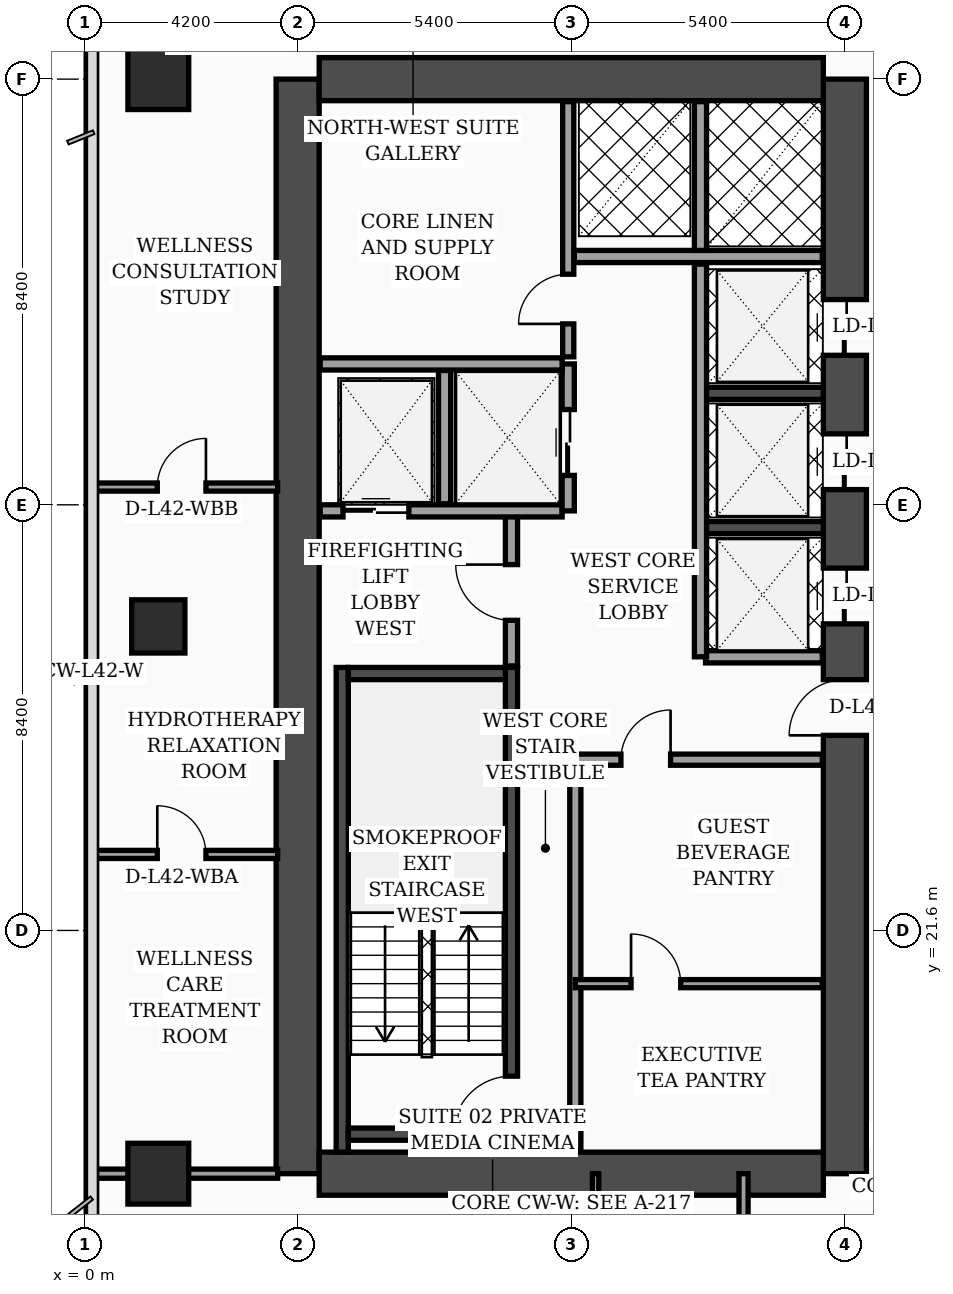
"""IFC4 building model, lengths in metres.
Left out: names, types, materials, properties, quantities, classifications, styles, units other than length and angle.
Written with IfcOpenShell. Run it as: python <this file> out.ifc"""

import sys

from ifc_helpers import new_model, si_unit, direction, frame, frame_2d, origin, origin_2d, place, context, subcontext, project, spatial, rectangle, extrude, element, fill, save


model = new_model("IFC4")
c1 = context("Model", 3, precision=1e-05, world=origin(), true_north=direction((0.0, 1.0)))
c2 = subcontext(c1, "Body", "Model", "MODEL_VIEW")
j1 = project(units=[si_unit("LENGTHUNIT", "METRE"), si_unit("PLANEANGLEUNIT", "RADIAN")], contexts=[c1])
p1 = place(None, origin())
s1 = spatial("IfcSite", under=j1, at=p1, CompositionType="ELEMENT")
p2 = place(p1, origin())
s2 = spatial("IfcBuilding", under=s1, at=p2, CompositionType="ELEMENT")
p3 = place(p2, frame((0.0, 0.0, 171.3)))
s3 = spatial("IfcBuildingStorey", under=s2, at=p3, CompositionType="ELEMENT", Elevation=171.3)
p4 = place(p3, frame((4.2, 16.8, 0.0), z_axis=(0.0, 0.0, 1.0), x_axis=(0.0, 1.0, 0.0)))
e1 = element("IfcWall", 1, at=p4, inside=s3, PredefinedType="SHEAR", context=c2, shape_type="SweptSolid", body=[
    extrude(rectangle(XDim=21.6, YDim=0.85, at=frame_2d((10.8, 0.0))), origin(), (0.0, 0.0, 1.0), 3.56),
])
p5 = place(p3, frame((15.0, 16.8, 0.0), z_axis=(0.0, 0.0, 1.0), x_axis=(0.0, 1.0, 0.0)))
e2 = element("IfcWall", 2, at=p5, inside=s3, PredefinedType="SHEAR", context=c2, shape_type="SweptSolid", body=[
    extrude(rectangle(XDim=21.6, YDim=0.85, at=frame_2d((10.8, 0.0))), origin(), (0.0, 0.0, 1.0), 3.56),
])
p6 = place(p5, frame((8.65, 0.0, 0.0)))
e3 = element("IfcOpeningElement", 3, at=p6, cuts=e2, PredefinedType="OPENING", context=c2, shape_type="SweptSolid", body=[
    extrude(rectangle(XDim=1.1, YDim=2.2, at=frame_2d((0.55, 1.1))), frame((0.0, 0.435, 0.0), z_axis=(0.0, -1.0, 0.0), x_axis=(1.0, 0.0, 0.0)), (0.0, 0.0, 1.0), 0.87),
])
p7 = place(p5, frame((10.85, 0.0, 0.0)))
e4 = element("IfcOpeningElement", 4, at=p7, cuts=e2, PredefinedType="OPENING", context=c2, shape_type="SweptSolid", body=[
    extrude(rectangle(XDim=1.1, YDim=2.2, at=frame_2d((0.55, 1.1))), frame((0.0, 0.435, 0.0), z_axis=(0.0, -1.0, 0.0), x_axis=(1.0, 0.0, 0.0)), (0.0, 0.0, 1.0), 0.87),
])
p8 = place(p5, frame((13.5, 0.0, 0.0)))
e5 = element("IfcOpeningElement", 5, at=p8, cuts=e2, PredefinedType="OPENING", context=c2, shape_type="SweptSolid", body=[
    extrude(rectangle(XDim=1.1, YDim=2.2, at=frame_2d((0.55, 1.1))), frame((0.0, 0.435, 0.0), z_axis=(0.0, -1.0, 0.0), x_axis=(1.0, 0.0, 0.0)), (0.0, 0.0, 1.0), 0.87),
])
p9 = place(p5, frame((16.15, 0.0, 0.0)))
e6 = element("IfcOpeningElement", 6, at=p9, cuts=e2, PredefinedType="OPENING", context=c2, shape_type="SweptSolid", body=[
    extrude(rectangle(XDim=1.1, YDim=2.2, at=frame_2d((0.55, 1.1))), frame((0.0, 0.435, 0.0), z_axis=(0.0, -1.0, 0.0), x_axis=(1.0, 0.0, 0.0)), (0.0, 0.0, 1.0), 0.87),
])
for number, where, z_axis, x_axis in (
    (7, (4.625, 38.4, 0.0), (0.0, 0.0, 1.0), (1.0, 0.0, 0.0)),
    (8, (4.625, 16.8, 0.0), (0.0, 0.0, 1.0), (1.0, 0.0, 0.0)),
):
    element("IfcWall", number, at=place(p3, frame(where, z_axis=z_axis, x_axis=x_axis)), inside=s3, PredefinedType="SHEAR", context=c2, shape_type="SweptSolid", body=[
        extrude(rectangle(XDim=9.95, YDim=0.85, at=frame_2d((4.975, 0.0))), origin(), (0.0, 0.0, 1.0), 3.56),
    ])
p10 = place(p3, frame((5.08, 17.225, 0.0), z_axis=(0.0, 0.0, 1.0), x_axis=(0.0, 1.0, 0.0)))
e9 = element("IfcWall", 9, at=p10, inside=s3, PredefinedType="SOLIDWALL", context=c2, shape_type="SweptSolid", body=[
    extrude(rectangle(XDim=9.565, YDim=0.24, at=frame_2d((4.782, 0.0))), origin(), (0.0, 0.0, 1.0), 3.56),
])
p11 = place(p3, frame((8.42, 17.225, 0.0), z_axis=(0.0, 0.0, 1.0), x_axis=(0.0, 1.0, 0.0)))
e10 = element("IfcWall", 10, at=p11, inside=s3, PredefinedType="SOLIDWALL", context=c2, shape_type="SweptSolid", body=[
    extrude(rectangle(XDim=9.565, YDim=0.24, at=frame_2d((4.782, 0.0))), origin(), (0.0, 0.0, 1.0), 3.56),
])
p12 = place(p11, frame((0.35, 0.0, 0.0)))
e11 = element("IfcOpeningElement", 11, at=p12, cuts=e10, PredefinedType="OPENING", context=c2, shape_type="SweptSolid", body=[
    extrude(rectangle(XDim=1.15, YDim=2.2, at=frame_2d((0.575, 1.1))), frame((0.0, 0.13, 0.0), z_axis=(0.0, -1.0, 0.0), x_axis=(1.0, 0.0, 0.0)), (0.0, 0.0, 1.0), 0.26),
])
for number, where, z_axis, x_axis in (
    (12, (5.2, 17.58, 0.0), (0.0, 0.0, 1.0), (1.0, 0.0, 0.0)),
    (13, (5.2, 26.67, 0.0), (0.0, 0.0, 1.0), (1.0, 0.0, 0.0)),
):
    element("IfcWall", number, at=place(p3, frame(where, z_axis=z_axis, x_axis=x_axis)), inside=s3, PredefinedType="SOLIDWALL", context=c2, shape_type="SweptSolid", body=[
        extrude(rectangle(XDim=3.1, YDim=0.24, at=frame_2d((1.55, 0.0))), origin(), (0.0, 0.0, 1.0), 3.56),
    ])
for number, where, z_axis, x_axis in (
    (14, (12.18, 29.55, 0.0), (0.0, 0.0, 1.0), (1.0, 0.0, 0.0)),
    (15, (12.18, 32.2, 0.0), (0.0, 0.0, 1.0), (1.0, 0.0, 0.0)),
):
    element("IfcWall", number, at=place(p3, frame(where, z_axis=z_axis, x_axis=x_axis)), inside=s3, PredefinedType="SOLIDWALL", context=c2, shape_type="SweptSolid", body=[
        extrude(rectangle(XDim=2.395, YDim=0.24, at=frame_2d((1.198, 0.0))), origin(), (0.0, 0.0, 1.0), 3.56),
    ])
p13 = place(p3, frame((1.45, 16.8, 0.0), z_axis=(0.0, 0.0, 1.0), x_axis=(1.0, 0.0, 0.0)))
e16 = element("IfcColumn", 16, at=p13, inside=s3, PredefinedType="COLUMN", context=c2, shape_type="SweptSolid", body=[
    extrude(rectangle(XDim=1.2, YDim=1.2, at=origin_2d()), origin(), (0.0, 0.0, 1.0), 3.56),
])
p14 = place(p3, frame((1.45, 27.6, 0.0), z_axis=(0.0, 0.0, 1.0), x_axis=(1.0, 0.0, 0.0)))
e17 = element("IfcColumn", 17, at=p14, inside=s3, PredefinedType="COLUMN", context=c2, shape_type="SweptSolid", body=[
    extrude(rectangle(XDim=1.05, YDim=1.05, at=origin_2d()), origin(), (0.0, 0.0, 1.0), 3.56),
])
p15 = place(p3, frame((1.45, 38.4, 0.0), z_axis=(0.0, 0.0, 1.0), x_axis=(1.0, 0.0, 0.0)))
e18 = element("IfcColumn", 18, at=p15, inside=s3, PredefinedType="COLUMN", context=c2, shape_type="SweptSolid", body=[
    extrude(rectangle(XDim=1.2, YDim=1.2, at=origin_2d()), origin(), (0.0, 0.0, 1.0), 3.56),
])
p16 = place(p3, frame((8.42, 26.82, 0.0), z_axis=(0.0, 0.0, 1.0), x_axis=(0.0, 1.0, 0.0)))
e19 = element("IfcWall", 19, at=p16, inside=s3, PredefinedType="SOLIDWALL", context=c2, shape_type="SweptSolid", body=[
    extrude(rectangle(XDim=3.0, YDim=0.24, at=frame_2d((1.5, 0.0))), origin(), (0.0, 0.0, 1.0), 3.56),
])
p17 = place(p16, frame((0.9, 0.0, 0.0)))
e20 = element("IfcOpeningElement", 20, at=p17, cuts=e19, PredefinedType="OPENING", context=c2, shape_type="SweptSolid", body=[
    extrude(rectangle(XDim=1.1, YDim=2.2, at=frame_2d((0.55, 1.1))), frame((0.0, 0.13, 0.0), z_axis=(0.0, -1.0, 0.0), x_axis=(1.0, 0.0, 0.0)), (0.0, 0.0, 1.0), 0.26),
])
p18 = place(p3, frame((4.645, 29.88, 0.0), z_axis=(0.0, 0.0, 1.0), x_axis=(1.0, 0.0, 0.0)))
e21 = element("IfcWall", 21, at=p18, inside=s3, PredefinedType="SOLIDWALL", context=c2, shape_type="SweptSolid", body=[
    extrude(rectangle(XDim=4.775, YDim=0.24, at=frame_2d((2.387, 0.0))), origin(), (0.0, 0.0, 1.0), 3.56),
])
p19 = place(p18, frame((0.45, 0.0, 0.0)))
e22 = element("IfcOpeningElement", 22, at=p19, cuts=e21, PredefinedType="OPENING", context=c2, shape_type="SweptSolid", body=[
    extrude(rectangle(XDim=1.3, YDim=2.35, at=frame_2d((0.65, 1.175))), frame((0.0, 0.13, 0.0), z_axis=(0.0, -1.0, 0.0), x_axis=(1.0, 0.0, 0.0)), (0.0, 0.0, 1.0), 0.26),
])
p20 = place(p3, frame((7.1, 30.02, 0.0), z_axis=(0.0, 0.0, 1.0), x_axis=(0.0, 1.0, 0.0)))
e23 = element("IfcWall", 23, at=p20, inside=s3, PredefinedType="SOLIDWALL", context=c2, shape_type="SweptSolid", body=[
    extrude(rectangle(XDim=2.63, YDim=0.24, at=frame_2d((1.315, 0.0))), origin(), (0.0, 0.0, 1.0), 3.56),
])
p21 = place(p3, frame((9.54, 29.88, 0.0), z_axis=(0.0, 0.0, 1.0), x_axis=(0.0, 1.0, 0.0)))
e24 = element("IfcWall", 24, at=p21, inside=s3, PredefinedType="SOLIDWALL", context=c2, shape_type="SweptSolid", body=[
    extrude(rectangle(XDim=2.9, YDim=0.24, at=frame_2d((1.45, 0.0))), origin(), (0.0, 0.0, 1.0), 3.56),
])
p22 = place(p21, frame((0.7, 0.0, 0.0)))
e25 = element("IfcOpeningElement", 25, at=p22, cuts=e24, PredefinedType="OPENING", context=c2, shape_type="SweptSolid", body=[
    extrude(rectangle(XDim=1.3, YDim=2.35, at=frame_2d((0.65, 1.175))), frame((0.0, 0.13, 0.0), z_axis=(0.0, -1.0, 0.0), x_axis=(1.0, 0.0, 0.0)), (0.0, 0.0, 1.0), 0.26),
])
p23 = place(p3, frame((4.645, 32.78, 0.0), z_axis=(0.0, 0.0, 1.0), x_axis=(1.0, 0.0, 0.0)))
e26 = element("IfcWall", 26, at=p23, inside=s3, PredefinedType="SOLIDWALL", context=c2, shape_type="SweptSolid", body=[
    extrude(rectangle(XDim=4.775, YDim=0.24, at=frame_2d((2.387, 0.0))), origin(), (0.0, 0.0, 1.0), 3.19),
])
p24 = place(p3, frame((9.68, 17.245, 0.0), z_axis=(0.0, 0.0, 1.0), x_axis=(0.0, 1.0, 0.0)))
e27 = element("IfcWall", 27, at=p24, inside=s3, PredefinedType="SOLIDWALL", context=c2, shape_type="SweptSolid", body=[
    extrude(rectangle(XDim=7.755, YDim=0.22, at=frame_2d((3.877, 0.0))), origin(), (0.0, 0.0, 1.0), 3.56),
])
p25 = place(p3, frame((9.54, 32.92, 0.0), z_axis=(0.0, 0.0, 1.0), x_axis=(0.0, 1.0, 0.0)))
e28 = element("IfcWall", 28, at=p25, inside=s3, PredefinedType="SOLIDWALL", context=c2, shape_type="SweptSolid", body=[
    extrude(rectangle(XDim=5.035, YDim=0.22, at=frame_2d((2.518, 0.0))), origin(), (0.0, 0.0, 1.0), 3.56),
])
p26 = place(p25, frame((0.65, 0.0, 0.0)))
e29 = element("IfcOpeningElement", 29, at=p26, cuts=e28, PredefinedType="OPENING", context=c2, shape_type="SweptSolid", body=[
    extrude(rectangle(XDim=0.98, YDim=2.15, at=frame_2d((0.49, 1.075))), frame((0.0, 0.12, 0.0), z_axis=(0.0, -1.0, 0.0), x_axis=(1.0, 0.0, 0.0)), (0.0, 0.0, 1.0), 0.24),
])
p27 = place(p3, frame((9.68, 20.55, 0.0), z_axis=(0.0, 0.0, 1.0), x_axis=(1.0, 0.0, 0.0)))
e30 = element("IfcWall", 30, at=p27, inside=s3, PredefinedType="PARTITIONING", context=c2, shape_type="SweptSolid", body=[
    extrude(rectangle(XDim=4.875, YDim=0.16, at=frame_2d((2.438, 0.0))), origin(), (0.0, 0.0, 1.0), 3.56),
])
p28 = place(p27, frame((1.1, 0.0, 0.0)))
e31 = element("IfcOpeningElement", 31, at=p28, cuts=e30, PredefinedType="OPENING", context=c2, shape_type="SweptSolid", body=[
    extrude(rectangle(XDim=0.98, YDim=2.15, at=frame_2d((0.49, 1.075))), frame((0.0, 0.09, 0.0), z_axis=(0.0, -1.0, 0.0), x_axis=(1.0, 0.0, 0.0)), (0.0, 0.0, 1.0), 0.18),
])
p29 = place(p3, frame((9.68, 24.97, 0.0), z_axis=(0.0, 0.0, 1.0), x_axis=(1.0, 0.0, 0.0)))
e32 = element("IfcWall", 32, at=p29, inside=s3, PredefinedType="SOLIDWALL", context=c2, shape_type="SweptSolid", body=[
    extrude(rectangle(XDim=4.875, YDim=0.22, at=frame_2d((2.438, 0.0))), origin(), (0.0, 0.0, 1.0), 2.94),
])
p30 = place(p29, frame((0.9, 0.0, 0.0)))
e33 = element("IfcOpeningElement", 33, at=p30, cuts=e32, PredefinedType="OPENING", context=c2, shape_type="SweptSolid", body=[
    extrude(rectangle(XDim=0.98, YDim=2.15, at=frame_2d((0.49, 1.075))), frame((0.0, 0.12, 0.0), z_axis=(0.0, -1.0, 0.0), x_axis=(1.0, 0.0, 0.0)), (0.0, 0.0, 1.0), 0.24),
])
p31 = place(p3, frame((12.25, 27.0, 0.0), z_axis=(0.0, 0.0, 1.0), x_axis=(1.0, 0.0, 0.0)))
e34 = element("IfcWall", 34, at=p31, inside=s3, PredefinedType="SOLIDWALL", context=c2, shape_type="SweptSolid", body=[
    extrude(rectangle(XDim=2.305, YDim=0.24, at=frame_2d((1.152, 0.0))), origin(), (0.0, 0.0, 1.0), 3.56),
])
p32 = place(p3, frame((12.15, 27.0, 0.0), z_axis=(0.0, 0.0, 1.0), x_axis=(0.0, 1.0, 0.0)))
e35 = element("IfcWall", 35, at=p32, inside=s3, PredefinedType="SOLIDWALL", context=c2, shape_type="SweptSolid", body=[
    extrude(rectangle(XDim=7.75, YDim=0.24, at=frame_2d((3.875, 0.0))), origin(), (0.0, 0.0, 1.0), 3.56),
])
p33 = place(p3, frame((9.66, 34.9, 0.0), z_axis=(0.0, 0.0, 1.0), x_axis=(1.0, 0.0, 0.0)))
e36 = element("IfcWall", 36, at=p33, inside=s3, PredefinedType="SOLIDWALL", context=c2, shape_type="SweptSolid", body=[
    extrude(rectangle(XDim=4.895, YDim=0.24, at=frame_2d((2.448, 0.0))), origin(), (0.0, 0.0, 1.0), 3.56),
])
p34 = place(p3, frame((12.15, 35.02, 0.0), z_axis=(0.0, 0.0, 1.0), x_axis=(0.0, 1.0, 0.0)))
e37 = element("IfcWall", 37, at=p34, inside=s3, PredefinedType="SOLIDWALL", context=c2, shape_type="SweptSolid", body=[
    extrude(rectangle(XDim=2.935, YDim=0.24, at=frame_2d((1.468, 0.0))), origin(), (0.0, 0.0, 1.0), 3.56),
])
p35 = place(p3, frame((0.08, 23.1, 0.0), z_axis=(0.0, 0.0, 1.0), x_axis=(1.0, 0.0, 0.0)))
e38 = element("IfcWall", 38, at=p35, inside=s3, PredefinedType="PARTITIONING", context=c2, shape_type="SweptSolid", body=[
    extrude(rectangle(XDim=3.725, YDim=0.16, at=frame_2d((1.862, 0.0))), origin(), (0.0, 0.0, 1.0), 3.04),
])
p36 = place(p35, frame((1.35, 0.0, 0.0)))
e39 = element("IfcOpeningElement", 39, at=p36, cuts=e38, PredefinedType="OPENING", context=c2, shape_type="SweptSolid", body=[
    extrude(rectangle(XDim=0.96, YDim=2.2, at=frame_2d((0.48, 1.1))), frame((0.0, 0.09, 0.0), z_axis=(0.0, -1.0, 0.0), x_axis=(1.0, 0.0, 0.0)), (0.0, 0.0, 1.0), 0.18),
])
p37 = place(p3, frame((0.08, 30.35, 0.0), z_axis=(0.0, 0.0, 1.0), x_axis=(1.0, 0.0, 0.0)))
e40 = element("IfcWall", 40, at=p37, inside=s3, PredefinedType="PARTITIONING", context=c2, shape_type="SweptSolid", body=[
    extrude(rectangle(XDim=3.725, YDim=0.16, at=frame_2d((1.862, 0.0))), origin(), (0.0, 0.0, 1.0), 3.04),
])
p38 = place(p37, frame((1.35, 0.0, 0.0)))
e41 = element("IfcOpeningElement", 41, at=p38, cuts=e40, PredefinedType="OPENING", context=c2, shape_type="SweptSolid", body=[
    extrude(rectangle(XDim=0.96, YDim=2.2, at=frame_2d((0.48, 1.1))), frame((0.0, 0.09, 0.0), z_axis=(0.0, -1.0, 0.0), x_axis=(1.0, 0.0, 0.0)), (0.0, 0.0, 1.0), 0.18),
])
p39 = place(p3, frame((0.08, 16.8, 0.0), z_axis=(0.0, 0.0, 1.0), x_axis=(1.0, 0.0, 0.0)))
e42 = element("IfcWall", 42, at=p39, inside=s3, PredefinedType="PARTITIONING", context=c2, shape_type="SweptSolid", body=[
    extrude(rectangle(XDim=3.725, YDim=0.18, at=frame_2d((1.862, 0.0))), origin(), (0.0, 0.0, 1.0), 2.94),
])
p40 = place(p3, frame((10.08, 14.75, 0.0), z_axis=(0.0, 0.0, 1.0), x_axis=(0.0, 1.0, 0.0)))
e43 = element("IfcWall", 43, at=p40, inside=s3, PredefinedType="PARTITIONING", context=c2, shape_type="SweptSolid", body=[
    extrude(rectangle(XDim=2.05, YDim=0.125, at=frame_2d((1.025, 0.0))), origin(), (0.0, 0.0, 1.0), 3.56),
])
p41 = place(p3, frame((13.0, 2.44, 0.0), z_axis=(0.0, 0.0, 1.0), x_axis=(0.0, 1.0, 0.0)))
e44 = element("IfcWall", 44, at=p41, inside=s3, PredefinedType="PARTITIONING", context=c2, shape_type="SweptSolid", body=[
    extrude(rectangle(XDim=14.36, YDim=0.18, at=frame_2d((7.18, 0.0))), origin(), (0.0, 0.0, 1.0), 2.94),
])
p42 = place(p41, frame((3.01, 0.0, 0.0)))
e45 = element("IfcOpeningElement", 45, at=p42, cuts=e44, PredefinedType="OPENING", context=c2, shape_type="SweptSolid", body=[
    extrude(rectangle(XDim=1.02, YDim=2.2, at=frame_2d((0.51, 1.1))), frame((0.0, 0.1, 0.0), z_axis=(0.0, -1.0, 0.0), x_axis=(1.0, 0.0, 0.0)), (0.0, 0.0, 1.0), 0.2),
])
p43 = place(p41, frame((10.1, 0.0, 0.0)))
e46 = element("IfcOpeningElement", 46, at=p43, cuts=e44, PredefinedType="OPENING", context=c2, shape_type="SweptSolid", body=[
    extrude(rectangle(XDim=1.02, YDim=2.2, at=frame_2d((0.51, 1.1))), frame((0.0, 0.1, 0.0), z_axis=(0.0, -1.0, 0.0), x_axis=(1.0, 0.0, 0.0)), (0.0, 0.0, 1.0), 0.2),
])
p44 = place(p17, origin())
e47 = element("IfcDoor", 47, at=p44, inside=s3, OperationType="SINGLE_SWING_RIGHT", PredefinedType="DOOR", context=c2, shape_type="SweptSolid", body=[
    extrude(rectangle(XDim=1.1, YDim=2.2, at=frame_2d((0.55, 1.1))), frame((0.0, 0.025, 0.0), z_axis=(0.0, -1.0, 0.0), x_axis=(1.0, 0.0, 0.0)), (0.0, 0.0, 1.0), 0.05),
])
fill(e20, e47)
p45 = place(p19, origin())
e48 = element("IfcDoor", 48, at=p45, inside=s3, OperationType="DOUBLE_DOOR_SLIDING", PredefinedType="DOOR", context=c2, shape_type="SweptSolid", body=[
    extrude(rectangle(XDim=1.3, YDim=2.35, at=frame_2d((0.65, 1.175))), frame((0.0, 0.025, 0.0), z_axis=(0.0, -1.0, 0.0), x_axis=(1.0, 0.0, 0.0)), (0.0, 0.0, 1.0), 0.05),
])
fill(e22, e48)
p46 = place(p22, origin())
e49 = element("IfcDoor", 49, at=p46, inside=s3, OperationType="DOUBLE_DOOR_SLIDING", PredefinedType="DOOR", context=c2, shape_type="SweptSolid", body=[
    extrude(rectangle(XDim=1.3, YDim=2.35, at=frame_2d((0.65, 1.175))), frame((0.0, 0.025, 0.0), z_axis=(0.0, -1.0, 0.0), x_axis=(1.0, 0.0, 0.0)), (0.0, 0.0, 1.0), 0.05),
])
fill(e25, e49)
p47 = place(p26, origin())
e50 = element("IfcDoor", 50, at=p47, inside=s3, OperationType="SINGLE_SWING_LEFT", PredefinedType="DOOR", context=c2, shape_type="SweptSolid", body=[
    extrude(rectangle(XDim=0.98, YDim=2.15, at=frame_2d((0.49, 1.075))), frame((0.0, 0.025, 0.0), z_axis=(0.0, -1.0, 0.0), x_axis=(1.0, 0.0, 0.0)), (0.0, 0.0, 1.0), 0.05),
])
fill(e29, e50)
p48 = place(p28, origin())
e51 = element("IfcDoor", 51, at=p48, inside=s3, OperationType="SINGLE_SWING_LEFT", PredefinedType="DOOR", context=c2, shape_type="SweptSolid", body=[
    extrude(rectangle(XDim=0.98, YDim=2.15, at=frame_2d((0.49, 1.075))), frame((0.0, 0.025, 0.0), z_axis=(0.0, -1.0, 0.0), x_axis=(1.0, 0.0, 0.0)), (0.0, 0.0, 1.0), 0.05),
])
fill(e31, e51)
p49 = place(p30, origin())
e52 = element("IfcDoor", 52, at=p49, inside=s3, OperationType="SINGLE_SWING_RIGHT", PredefinedType="DOOR", context=c2, shape_type="SweptSolid", body=[
    extrude(rectangle(XDim=0.98, YDim=2.15, at=frame_2d((0.49, 1.075))), frame((0.0, 0.025, 0.0), z_axis=(0.0, -1.0, 0.0), x_axis=(1.0, 0.0, 0.0)), (0.0, 0.0, 1.0), 0.05),
])
fill(e33, e52)
p50 = place(p36, origin())
e53 = element("IfcDoor", 53, at=p50, inside=s3, OperationType="SINGLE_SWING_LEFT", PredefinedType="DOOR", context=c2, shape_type="SweptSolid", body=[
    extrude(rectangle(XDim=0.96, YDim=2.2, at=frame_2d((0.48, 1.1))), frame((0.0, 0.025, 0.0), z_axis=(0.0, -1.0, 0.0), x_axis=(1.0, 0.0, 0.0)), (0.0, 0.0, 1.0), 0.05),
])
fill(e39, e53)
p51 = place(p38, origin())
e54 = element("IfcDoor", 54, at=p51, inside=s3, OperationType="SINGLE_SWING_RIGHT", PredefinedType="DOOR", context=c2, shape_type="SweptSolid", body=[
    extrude(rectangle(XDim=0.96, YDim=2.2, at=frame_2d((0.48, 1.1))), frame((0.0, 0.025, 0.0), z_axis=(0.0, -1.0, 0.0), x_axis=(1.0, 0.0, 0.0)), (0.0, 0.0, 1.0), 0.05),
])
fill(e41, e54)
p52 = place(p12, origin())
e55 = element("IfcDoor", 55, at=p52, inside=s3, OperationType="SINGLE_SWING_LEFT", PredefinedType="DOOR", context=c2, shape_type="SweptSolid", body=[
    extrude(rectangle(XDim=1.15, YDim=2.2, at=frame_2d((0.575, 1.1))), frame((0.0, 0.025, 0.0), z_axis=(0.0, -1.0, 0.0), x_axis=(1.0, 0.0, 0.0)), (0.0, 0.0, 1.0), 0.05),
])
fill(e11, e55)
p53 = place(p6, origin())
e56 = element("IfcDoor", 56, at=p53, inside=s3, OperationType="SINGLE_SWING_LEFT", PredefinedType="DOOR", context=c2, shape_type="SweptSolid", body=[
    extrude(rectangle(XDim=1.1, YDim=2.2, at=frame_2d((0.55, 1.1))), frame((0.0, 0.025, 0.0), z_axis=(0.0, -1.0, 0.0), x_axis=(1.0, 0.0, 0.0)), (0.0, 0.0, 1.0), 0.05),
])
fill(e3, e56)
p54 = place(p7, origin())
e57 = element("IfcDoor", 57, at=p54, inside=s3, OperationType="DOUBLE_DOOR_SLIDING", PredefinedType="DOOR", context=c2, shape_type="SweptSolid", body=[
    extrude(rectangle(XDim=1.1, YDim=2.2, at=frame_2d((0.55, 1.1))), frame((0.0, 0.025, 0.0), z_axis=(0.0, -1.0, 0.0), x_axis=(1.0, 0.0, 0.0)), (0.0, 0.0, 1.0), 0.05),
])
fill(e4, e57)
p55 = place(p8, origin())
e58 = element("IfcDoor", 58, at=p55, inside=s3, OperationType="DOUBLE_DOOR_SLIDING", PredefinedType="DOOR", context=c2, shape_type="SweptSolid", body=[
    extrude(rectangle(XDim=1.1, YDim=2.2, at=frame_2d((0.55, 1.1))), frame((0.0, 0.025, 0.0), z_axis=(0.0, -1.0, 0.0), x_axis=(1.0, 0.0, 0.0)), (0.0, 0.0, 1.0), 0.05),
])
fill(e5, e58)
p56 = place(p9, origin())
e59 = element("IfcDoor", 59, at=p56, inside=s3, OperationType="DOUBLE_DOOR_SLIDING", PredefinedType="DOOR", context=c2, shape_type="SweptSolid", body=[
    extrude(rectangle(XDim=1.1, YDim=2.2, at=frame_2d((0.55, 1.1))), frame((0.0, 0.025, 0.0), z_axis=(0.0, -1.0, 0.0), x_axis=(1.0, 0.0, 0.0)), (0.0, 0.0, 1.0), 0.05),
])
fill(e6, e59)
save(model, sys.argv[1])
